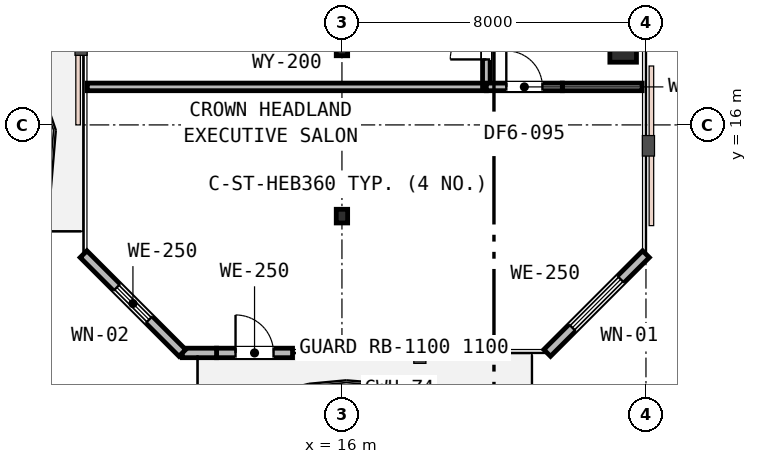
"""IFC4 building model, lengths in metres.
Left out: names, types, materials, properties, quantities, classifications, styles, units other than length and angle.
Written with IfcOpenShell. Run it as: python <this file> out.ifc"""

import sys

from ifc_helpers import new_model, si_unit, direction, frame, frame_2d, origin, origin_2d, place, context, subcontext, project, spatial, rectangle, i_section, extrude, element, fill, save


model = new_model("IFC4")
c1 = context("Model", 3, precision=1e-05, world=origin(), true_north=direction((0.0, 1.0)))
c2 = subcontext(c1, "Body", "Model", "MODEL_VIEW")
j1 = project(units=[si_unit("LENGTHUNIT", "METRE"), si_unit("PLANEANGLEUNIT", "RADIAN")], contexts=[c1])
p1 = place(None, origin())
s1 = spatial("IfcSite", under=j1, at=p1, CompositionType="ELEMENT")
p2 = place(p1, origin())
s2 = spatial("IfcBuilding", under=s1, at=p2, CompositionType="ELEMENT")
p3 = place(p2, frame((0.0, 0.0, 283.0)))
s3 = spatial("IfcBuildingStorey", under=s2, at=p3, CompositionType="ELEMENT", Elevation=283.0)
p4 = place(p3, frame((23.4, 18.0, 0.0), z_axis=(0.0, 0.0, 1.0), x_axis=(1.0, 0.0, 0.0)))
e1 = element("IfcColumn", 1, at=p4, inside=s3, PredefinedType="COLUMN", context=c2, shape_type="SweptSolid", body=[
    extrude(rectangle(XDim=0.7, YDim=0.7, at=origin_2d()), origin(), (0.0, 0.0, 1.0), 3.8),
])
for number, where, z_axis, x_axis in (
    (2, (16.0, 13.6, 0.0), (0.0, 0.0, 1.0), (1.0, 0.0, 0.0)),
    (3, (16.0, 18.0, 0.0), (0.0, 0.0, 1.0), (1.0, 0.0, 0.0)),
):
    element("IfcColumn", number, at=place(p3, frame(where, z_axis=z_axis, x_axis=x_axis)), inside=s3, PredefinedType="COLUMN", context=c2, shape_type="SweptSolid", body=[
        extrude(i_section(OverallWidth=0.3, OverallDepth=0.36, WebThickness=0.013, FlangeThickness=0.022, FilletRadius=0.027, at=origin_2d()), origin(), (0.0, 0.0, 1.0), 3.8),
    ])
p5 = place(p3, frame((12.7, 10.0, 0.0), z_axis=(0.0, 0.0, 1.0), x_axis=(1.0, 0.0, 0.0)))
e4 = element("IfcWall", 4, at=p5, inside=s3, PredefinedType="STANDARD", context=c2, shape_type="SweptSolid", body=[
    extrude(rectangle(XDim=2.0, YDim=0.25, at=frame_2d((1.0, 0.0))), origin(), (0.0, 0.0, 1.0), 3.53),
])
p6 = place(p5, frame((0.5, 0.0, 0.0)))
e5 = element("IfcOpeningElement", 5, at=p6, cuts=e4, PredefinedType="OPENING", context=c2, shape_type="SweptSolid", body=[
    extrude(rectangle(XDim=1.0, YDim=2.15, at=frame_2d((0.5, 1.075))), frame((0.0, 0.135, 0.0), z_axis=(0.0, -1.0, 0.0), x_axis=(1.0, 0.0, 0.0)), (0.0, 0.0, 1.0), 0.27),
])
p7 = place(p3, frame((11.8, 10.0, 0.0), z_axis=(0.0, 0.0, 1.0), x_axis=(1.0, 0.0, 0.0)))
e6 = element("IfcWall", 6, at=p7, inside=s3, PredefinedType="STANDARD", context=c2, shape_type="SweptSolid", body=[
    extrude(rectangle(XDim=0.9, YDim=0.25, at=frame_2d((0.45, 0.0))), origin(), (0.0, 0.0, 1.0), 3.53),
])
p8 = place(p3, frame((21.4, 10.0, 0.0), z_axis=(0.0, 0.0, 1.0), x_axis=(0.707106781187, 0.707106781187, 0.0)))
e7 = element("IfcWall", 7, at=p8, inside=s3, PredefinedType="STANDARD", context=c2, shape_type="SweptSolid", body=[
    extrude(rectangle(XDim=3.677, YDim=0.25, at=frame_2d((1.839, 0.0))), origin(), (0.0, 0.0, 1.0), 3.53),
])
p9 = place(p8, frame((0.939, 0.0, 0.75)))
e8 = element("IfcOpeningElement", 8, at=p9, cuts=e7, PredefinedType="OPENING", context=c2, shape_type="SweptSolid", body=[
    extrude(rectangle(XDim=1.8, YDim=1.85, at=frame_2d((0.9, 0.925))), frame((0.0, 0.135, 0.0), z_axis=(0.0, -1.0, 0.0), x_axis=(1.0, 0.0, 0.0)), (0.0, 0.0, 1.0), 0.27),
])
p10 = place(p3, frame((9.2, 12.6, 0.0), z_axis=(0.0, 0.0, 1.0), x_axis=(0.707106781187, -0.707106781187, 0.0)))
e9 = element("IfcWall", 9, at=p10, inside=s3, PredefinedType="STANDARD", context=c2, shape_type="SweptSolid", body=[
    extrude(rectangle(XDim=3.677, YDim=0.25, at=frame_2d((1.839, 0.0))), origin(), (0.0, 0.0, 1.0), 3.53),
])
p11 = place(p10, frame((1.238, 0.0, 0.85)))
e10 = element("IfcOpeningElement", 10, at=p11, cuts=e9, PredefinedType="OPENING", context=c2, shape_type="SweptSolid", body=[
    extrude(rectangle(XDim=1.2, YDim=1.6, at=frame_2d((0.6, 0.8))), frame((0.0, 0.135, 0.0), z_axis=(0.0, -1.0, 0.0), x_axis=(1.0, 0.0, 0.0)), (0.0, 0.0, 1.0), 0.27),
])
p12 = place(p3, frame((9.3, 17.0, 0.0), z_axis=(0.0, 0.0, 1.0), x_axis=(1.0, 0.0, 0.0)))
e11 = element("IfcWall", 11, at=p12, inside=s3, PredefinedType="PARTITIONING", context=c2, shape_type="SweptSolid", body=[
    extrude(rectangle(XDim=10.5, YDim=0.2, at=frame_2d((5.25, 0.0))), origin(), (0.0, 0.0, 1.0), 3.24),
])
p13 = place(p3, frame((21.8, 17.0, 0.0), z_axis=(0.0, 0.0, 1.0), x_axis=(1.0, 0.0, 0.0)))
e12 = element("IfcWall", 12, at=p13, inside=s3, PredefinedType="PARTITIONING", context=c2, shape_type="SweptSolid", body=[
    extrude(rectangle(XDim=2.1, YDim=0.2, at=frame_2d((1.05, 0.0))), origin(), (0.0, 0.0, 1.0), 3.53),
])
p14 = place(p3, frame((19.8, 17.0, 0.0), z_axis=(0.0, 0.0, 1.0), x_axis=(0.0, 1.0, 0.0)))
e13 = element("IfcWall", 13, at=p14, inside=s3, PredefinedType="PARTITIONING", context=c2, shape_type="SweptSolid", body=[
    extrude(rectangle(XDim=11.6, YDim=0.2, at=frame_2d((5.8, 0.0))), origin(), (0.0, 0.0, 1.0), 3.24),
])
p15 = place(p14, frame((0.723, 0.0, 0.0)))
e14 = element("IfcOpeningElement", 14, at=p15, cuts=e13, PredefinedType="OPENING", context=c2, shape_type="SweptSolid", body=[
    extrude(rectangle(XDim=0.95, YDim=2.15, at=frame_2d((0.475, 1.075))), frame((0.0, 0.11, 0.0), z_axis=(0.0, -1.0, 0.0), x_axis=(1.0, 0.0, 0.0)), (0.0, 0.0, 1.0), 0.22),
])
p16 = place(p3, frame((19.8, 17.0, 0.0), z_axis=(0.0, 0.0, 1.0), x_axis=(1.0, 0.0, 0.0)))
e15 = element("IfcWall", 15, at=p16, inside=s3, PredefinedType="PARTITIONING", context=c2, shape_type="SweptSolid", body=[
    extrude(rectangle(XDim=2.0, YDim=0.2, at=frame_2d((1.0, 0.0))), origin(), (0.0, 0.0, 1.0), 3.53),
])
p17 = place(p16, frame((0.525, 0.0, 0.0)))
e16 = element("IfcOpeningElement", 16, at=p17, cuts=e15, PredefinedType="OPENING", context=c2, shape_type="SweptSolid", body=[
    extrude(rectangle(XDim=0.95, YDim=2.15, at=frame_2d((0.475, 1.075))), frame((0.0, 0.11, 0.0), z_axis=(0.0, -1.0, 0.0), x_axis=(1.0, 0.0, 0.0)), (0.0, 0.0, 1.0), 0.22),
])
p18 = place(p6, origin())
e17 = element("IfcDoor", 17, at=p18, inside=s3, OperationType="SINGLE_SWING_LEFT", PredefinedType="DOOR", context=c2, shape_type="SweptSolid", body=[
    extrude(rectangle(XDim=1.0, YDim=2.15, at=frame_2d((0.5, 1.075))), frame((0.0, 0.025, 0.0), z_axis=(0.0, -1.0, 0.0), x_axis=(1.0, 0.0, 0.0)), (0.0, 0.0, 1.0), 0.05),
])
fill(e5, e17)
p19 = place(p9, origin())
e18 = element("IfcWindow", 18, at=p19, inside=s3, PartitioningType="SINGLE_PANEL", PredefinedType="WINDOW", context=c2, shape_type="SweptSolid", body=[
    extrude(rectangle(XDim=1.8, YDim=1.85, at=frame_2d((0.9, 0.925))), frame((0.0, 0.03, 0.0), z_axis=(0.0, -1.0, 0.0), x_axis=(1.0, 0.0, 0.0)), (0.0, 0.0, 1.0), 0.06),
])
fill(e8, e18)
p20 = place(p11, origin())
e19 = element("IfcWindow", 19, at=p20, inside=s3, PartitioningType="SINGLE_PANEL", PredefinedType="WINDOW", context=c2, shape_type="SweptSolid", body=[
    extrude(rectangle(XDim=1.2, YDim=1.6, at=frame_2d((0.6, 0.8))), frame((0.0, 0.03, 0.0), z_axis=(0.0, -1.0, 0.0), x_axis=(1.0, 0.0, 0.0)), (0.0, 0.0, 1.0), 0.06),
])
fill(e10, e19)
p21 = place(p15, origin())
e20 = element("IfcDoor", 20, at=p21, inside=s3, OperationType="SINGLE_SWING_LEFT", PredefinedType="DOOR", context=c2, shape_type="SweptSolid", body=[
    extrude(rectangle(XDim=0.95, YDim=2.15, at=frame_2d((0.475, 1.075))), frame((0.0, 0.025, 0.0), z_axis=(0.0, -1.0, 0.0), x_axis=(1.0, 0.0, 0.0)), (0.0, 0.0, 1.0), 0.05),
])
fill(e14, e20)
p22 = place(p17, origin())
e21 = element("IfcDoor", 21, at=p22, inside=s3, OperationType="SINGLE_SWING_LEFT", PredefinedType="DOOR", context=c2, shape_type="SweptSolid", body=[
    extrude(rectangle(XDim=0.95, YDim=2.15, at=frame_2d((0.475, 1.075))), frame((0.0, 0.025, 0.0), z_axis=(0.0, -1.0, 0.0), x_axis=(1.0, 0.0, 0.0)), (0.0, 0.0, 1.0), 0.05),
])
fill(e16, e21)
save(model, sys.argv[1])
